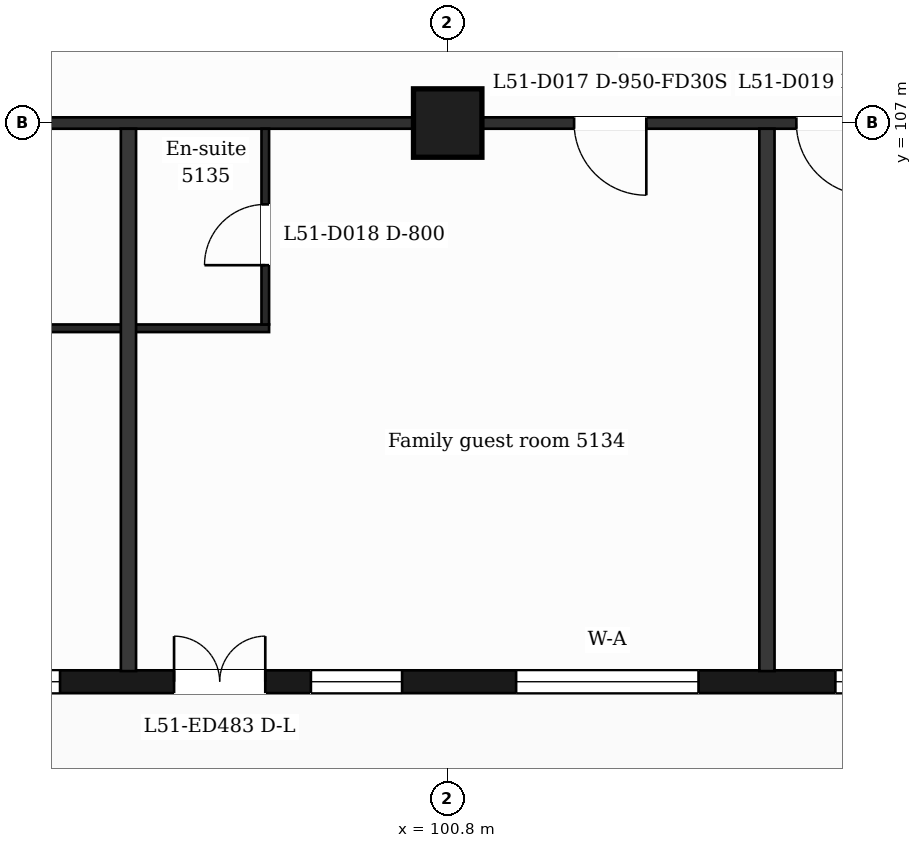
"""IFC4 building model, lengths in metres.
Left out: names, types, materials, properties, quantities, classifications, styles, units other than length and angle.
Written with IfcOpenShell. Run it as: python <this file> out.ifc"""

import sys

from ifc_helpers import new_model, si_unit, direction, frame, frame_2d, origin, origin_2d, place, context, subcontext, project, spatial, rectangle, extrude, element, fill, save


model = new_model("IFC4")
c1 = context("Model", 3, precision=1e-05, world=origin(), true_north=direction((0.0, 1.0)))
c2 = subcontext(c1, "Body", "Model", "MODEL_VIEW")
j1 = project(units=[si_unit("LENGTHUNIT", "METRE"), si_unit("PLANEANGLEUNIT", "RADIAN")], contexts=[c1])
p1 = place(None, origin())
s1 = spatial("IfcSite", under=j1, at=p1, CompositionType="ELEMENT")
p2 = place(p1, origin())
s2 = spatial("IfcBuilding", under=s1, at=p2, CompositionType="ELEMENT")
p3 = place(p2, frame((0.0, 0.0, 213.3)))
s3 = spatial("IfcBuildingStorey", under=s2, at=p3, CompositionType="ELEMENT", Elevation=213.3)
p4 = place(p3, frame((100.8, 107.0, 0.0), z_axis=(0.0, 0.0, 1.0), x_axis=(1.0, 0.0, 0.0)))
e1 = element("IfcColumn", 1, at=p4, inside=s3, PredefinedType="COLUMN", context=c2, shape_type="SweptSolid", body=[
    extrude(rectangle(XDim=0.9, YDim=0.9, at=origin_2d()), origin(), (0.0, 0.0, 1.0), 3.7),
])
p5 = place(p3, frame((89.85, 99.65, 0.0), z_axis=(0.0, 0.0, 1.0), x_axis=(1.0, 0.0, 0.0)))
e2 = element("IfcWall", 2, at=p5, inside=s3, PredefinedType="SOLIDWALL", context=c2, shape_type="SweptSolid", body=[
    extrude(rectangle(XDim=47.25, YDim=0.3, at=frame_2d((23.625, 0.0))), origin(), (0.0, 0.0, 1.0), 3.38),
])
p6 = place(p5, frame((0.725, 0.0, 0.9)))
e3 = element("IfcOpeningElement", 3, at=p6, cuts=e2, PredefinedType="OPENING", context=c2, shape_type="SweptSolid", body=[
    extrude(rectangle(XDim=1.2, YDim=2.1, at=frame_2d((0.6, 1.05))), frame((0.0, 0.16, 0.0), z_axis=(0.0, -1.0, 0.0), x_axis=(1.0, 0.0, 0.0)), (0.0, 0.0, 1.0), 0.32),
])
p7 = place(p5, frame((3.45, 0.0, 0.9)))
e4 = element("IfcOpeningElement", 4, at=p7, cuts=e2, PredefinedType="OPENING", context=c2, shape_type="SweptSolid", body=[
    extrude(rectangle(XDim=2.4, YDim=2.1, at=frame_2d((1.2, 1.05))), frame((0.0, 0.16, 0.0), z_axis=(0.0, -1.0, 0.0), x_axis=(1.0, 0.0, 0.0)), (0.0, 0.0, 1.0), 0.32),
])
p8 = place(p5, frame((7.35, 0.0, 0.0)))
e5 = element("IfcOpeningElement", 5, at=p8, cuts=e2, PredefinedType="OPENING", context=c2, shape_type="SweptSolid", body=[
    extrude(rectangle(XDim=1.2, YDim=2.4, at=frame_2d((0.6, 1.2))), frame((0.0, 0.16, 0.0), z_axis=(0.0, -1.0, 0.0), x_axis=(1.0, 0.0, 0.0)), (0.0, 0.0, 1.0), 0.32),
])
p9 = place(p5, frame((9.15, 0.0, 0.9)))
e6 = element("IfcOpeningElement", 6, at=p9, cuts=e2, PredefinedType="OPENING", context=c2, shape_type="SweptSolid", body=[
    extrude(rectangle(XDim=1.2, YDim=2.1, at=frame_2d((0.6, 1.05))), frame((0.0, 0.16, 0.0), z_axis=(0.0, -1.0, 0.0), x_axis=(1.0, 0.0, 0.0)), (0.0, 0.0, 1.0), 0.32),
])
p10 = place(p5, frame((11.85, 0.0, 0.9)))
e7 = element("IfcOpeningElement", 7, at=p10, cuts=e2, PredefinedType="OPENING", context=c2, shape_type="SweptSolid", body=[
    extrude(rectangle(XDim=2.4, YDim=2.1, at=frame_2d((1.2, 1.05))), frame((0.0, 0.16, 0.0), z_axis=(0.0, -1.0, 0.0), x_axis=(1.0, 0.0, 0.0)), (0.0, 0.0, 1.0), 0.32),
])
p11 = place(p5, frame((16.05, 0.0, 0.9)))
e8 = element("IfcOpeningElement", 8, at=p11, cuts=e2, PredefinedType="OPENING", context=c2, shape_type="SweptSolid", body=[
    extrude(rectangle(XDim=2.4, YDim=2.1, at=frame_2d((1.2, 1.05))), frame((0.0, 0.16, 0.0), z_axis=(0.0, -1.0, 0.0), x_axis=(1.0, 0.0, 0.0)), (0.0, 0.0, 1.0), 0.32),
])
p12 = place(p5, frame((20.85, 0.0, 0.9)))
e9 = element("IfcOpeningElement", 9, at=p12, cuts=e2, PredefinedType="OPENING", context=c2, shape_type="SweptSolid", body=[
    extrude(rectangle(XDim=1.2, YDim=2.1, at=frame_2d((0.6, 1.05))), frame((0.0, 0.16, 0.0), z_axis=(0.0, -1.0, 0.0), x_axis=(1.0, 0.0, 0.0)), (0.0, 0.0, 1.0), 0.32),
])
p13 = place(p5, frame((25.05, 0.0, 0.9)))
e10 = element("IfcOpeningElement", 10, at=p13, cuts=e2, PredefinedType="OPENING", context=c2, shape_type="SweptSolid", body=[
    extrude(rectangle(XDim=1.2, YDim=2.1, at=frame_2d((0.6, 1.05))), frame((0.0, 0.16, 0.0), z_axis=(0.0, -1.0, 0.0), x_axis=(1.0, 0.0, 0.0)), (0.0, 0.0, 1.0), 0.32),
])
p14 = place(p5, frame((28.65, 0.0, 0.9)))
e11 = element("IfcOpeningElement", 11, at=p14, cuts=e2, PredefinedType="OPENING", context=c2, shape_type="SweptSolid", body=[
    extrude(rectangle(XDim=2.4, YDim=2.1, at=frame_2d((1.2, 1.05))), frame((0.0, 0.16, 0.0), z_axis=(0.0, -1.0, 0.0), x_axis=(1.0, 0.0, 0.0)), (0.0, 0.0, 1.0), 0.32),
])
p15 = place(p5, frame((32.85, 0.0, 0.9)))
e12 = element("IfcOpeningElement", 12, at=p15, cuts=e2, PredefinedType="OPENING", context=c2, shape_type="SweptSolid", body=[
    extrude(rectangle(XDim=2.4, YDim=2.1, at=frame_2d((1.2, 1.05))), frame((0.0, 0.16, 0.0), z_axis=(0.0, -1.0, 0.0), x_axis=(1.0, 0.0, 0.0)), (0.0, 0.0, 1.0), 0.32),
])
p16 = place(p5, frame((37.05, 0.0, 0.9)))
e13 = element("IfcOpeningElement", 13, at=p16, cuts=e2, PredefinedType="OPENING", context=c2, shape_type="SweptSolid", body=[
    extrude(rectangle(XDim=2.4, YDim=2.1, at=frame_2d((1.2, 1.05))), frame((0.0, 0.16, 0.0), z_axis=(0.0, -1.0, 0.0), x_axis=(1.0, 0.0, 0.0)), (0.0, 0.0, 1.0), 0.32),
])
p17 = place(p5, frame((41.25, 0.0, 0.9)))
e14 = element("IfcOpeningElement", 14, at=p17, cuts=e2, PredefinedType="OPENING", context=c2, shape_type="SweptSolid", body=[
    extrude(rectangle(XDim=2.4, YDim=2.1, at=frame_2d((1.2, 1.05))), frame((0.0, 0.16, 0.0), z_axis=(0.0, -1.0, 0.0), x_axis=(1.0, 0.0, 0.0)), (0.0, 0.0, 1.0), 0.32),
])
p18 = place(p5, frame((45.25, 0.0, 0.9)))
e15 = element("IfcOpeningElement", 15, at=p18, cuts=e2, PredefinedType="OPENING", context=c2, shape_type="SweptSolid", body=[
    extrude(rectangle(XDim=1.2, YDim=2.1, at=frame_2d((0.6, 1.05))), frame((0.0, 0.16, 0.0), z_axis=(0.0, -1.0, 0.0), x_axis=(1.0, 0.0, 0.0)), (0.0, 0.0, 1.0), 0.32),
])
p19 = place(p3, frame((94.45, 104.3, 0.0), z_axis=(0.0, 0.0, 1.0), x_axis=(1.0, 0.0, 0.0)))
e16 = element("IfcWall", 16, at=p19, inside=s3, PredefinedType="PARTITIONING", context=c2, shape_type="SweptSolid", body=[
    extrude(rectangle(XDim=4.0, YDim=0.1, at=frame_2d((2.0, 0.0))), origin(), (0.0, 0.0, 1.0), 3.38),
])
p20 = place(p3, frame((87.018, 107.0, 0.0), z_axis=(0.0, 0.0, 1.0), x_axis=(1.0, 0.0, 0.0)))
e17 = element("IfcWall", 17, at=p20, inside=s3, PredefinedType="PARTITIONING", context=c2, shape_type="SweptSolid", body=[
    extrude(rectangle(XDim=52.765, YDim=0.15, at=frame_2d((26.382, 0.0))), origin(), (0.0, 0.0, 1.0), 3.38),
])
p21 = place(p20, frame((1.276, 0.0, 0.0)))
e18 = element("IfcOpeningElement", 18, at=p21, cuts=e17, PredefinedType="OPENING", context=c2, shape_type="SweptSolid", body=[
    extrude(rectangle(XDim=0.95, YDim=2.1, at=frame_2d((0.475, 1.05))), frame((0.0, 0.085, 0.0), z_axis=(0.0, -1.0, 0.0), x_axis=(1.0, 0.0, 0.0)), (0.0, 0.0, 1.0), 0.17),
])
p22 = place(p20, frame((6.034, 0.0, 0.0)))
e19 = element("IfcOpeningElement", 19, at=p22, cuts=e17, PredefinedType="OPENING", context=c2, shape_type="SweptSolid", body=[
    extrude(rectangle(XDim=0.95, YDim=2.1, at=frame_2d((0.475, 1.05))), frame((0.0, 0.085, 0.0), z_axis=(0.0, -1.0, 0.0), x_axis=(1.0, 0.0, 0.0)), (0.0, 0.0, 1.0), 0.17),
])
p23 = place(p20, frame((15.445, 0.0, 0.0)))
e20 = element("IfcOpeningElement", 20, at=p23, cuts=e17, PredefinedType="OPENING", context=c2, shape_type="SweptSolid", body=[
    extrude(rectangle(XDim=0.95, YDim=2.1, at=frame_2d((0.475, 1.05))), frame((0.0, 0.085, 0.0), z_axis=(0.0, -1.0, 0.0), x_axis=(1.0, 0.0, 0.0)), (0.0, 0.0, 1.0), 0.17),
])
p24 = place(p20, frame((18.369, 0.0, 0.0)))
e21 = element("IfcOpeningElement", 21, at=p24, cuts=e17, PredefinedType="OPENING", context=c2, shape_type="SweptSolid", body=[
    extrude(rectangle(XDim=0.95, YDim=2.1, at=frame_2d((0.475, 1.05))), frame((0.0, 0.085, 0.0), z_axis=(0.0, -1.0, 0.0), x_axis=(1.0, 0.0, 0.0)), (0.0, 0.0, 1.0), 0.17),
])
p25 = place(p20, frame((24.519, 0.0, 0.0)))
e22 = element("IfcOpeningElement", 22, at=p25, cuts=e17, PredefinedType="OPENING", context=c2, shape_type="SweptSolid", body=[
    extrude(rectangle(XDim=0.95, YDim=2.1, at=frame_2d((0.475, 1.05))), frame((0.0, 0.085, 0.0), z_axis=(0.0, -1.0, 0.0), x_axis=(1.0, 0.0, 0.0)), (0.0, 0.0, 1.0), 0.17),
])
p26 = place(p20, frame((26.632, 0.0, 0.0)))
e23 = element("IfcOpeningElement", 23, at=p26, cuts=e17, PredefinedType="OPENING", context=c2, shape_type="SweptSolid", body=[
    extrude(rectangle(XDim=1.0, YDim=2.1, at=frame_2d((0.5, 1.05))), frame((0.0, 0.085, 0.0), z_axis=(0.0, -1.0, 0.0), x_axis=(1.0, 0.0, 0.0)), (0.0, 0.0, 1.0), 0.17),
])
p27 = place(p20, frame((33.422, 0.0, 0.0)))
e24 = element("IfcOpeningElement", 24, at=p27, cuts=e17, PredefinedType="OPENING", context=c2, shape_type="SweptSolid", body=[
    extrude(rectangle(XDim=0.95, YDim=2.1, at=frame_2d((0.475, 1.05))), frame((0.0, 0.085, 0.0), z_axis=(0.0, -1.0, 0.0), x_axis=(1.0, 0.0, 0.0)), (0.0, 0.0, 1.0), 0.17),
])
p28 = place(p20, frame((35.057, 0.0, 0.0)))
e25 = element("IfcOpeningElement", 25, at=p28, cuts=e17, PredefinedType="OPENING", context=c2, shape_type="SweptSolid", body=[
    extrude(rectangle(XDim=0.95, YDim=2.1, at=frame_2d((0.475, 1.05))), frame((0.0, 0.085, 0.0), z_axis=(0.0, -1.0, 0.0), x_axis=(1.0, 0.0, 0.0)), (0.0, 0.0, 1.0), 0.17),
])
p29 = place(p20, frame((44.532, 0.0, 0.0)))
e26 = element("IfcOpeningElement", 26, at=p29, cuts=e17, PredefinedType="OPENING", context=c2, shape_type="SweptSolid", body=[
    extrude(rectangle(XDim=1.0, YDim=2.1, at=frame_2d((0.5, 1.05))), frame((0.0, 0.085, 0.0), z_axis=(0.0, -1.0, 0.0), x_axis=(1.0, 0.0, 0.0)), (0.0, 0.0, 1.0), 0.17),
])
p30 = place(p20, frame((48.249, 0.0, 0.0)))
e27 = element("IfcOpeningElement", 27, at=p30, cuts=e17, PredefinedType="OPENING", context=c2, shape_type="SweptSolid", body=[
    extrude(rectangle(XDim=0.95, YDim=2.1, at=frame_2d((0.475, 1.05))), frame((0.0, 0.085, 0.0), z_axis=(0.0, -1.0, 0.0), x_axis=(1.0, 0.0, 0.0)), (0.0, 0.0, 1.0), 0.17),
])
p31 = place(p3, frame((96.6, 99.79, 0.0), z_axis=(0.0, 0.0, 1.0), x_axis=(0.0, 1.0, 0.0)))
e28 = element("IfcWall", 28, at=p31, inside=s3, PredefinedType="PARTITIONING", context=c2, shape_type="SweptSolid", body=[
    extrude(rectangle(XDim=7.135, YDim=0.2, at=frame_2d((3.567, 0.0))), origin(), (0.0, 0.0, 1.0), 3.38),
])
p32 = place(p3, frame((98.4, 104.35, 0.0), z_axis=(0.0, 0.0, 1.0), x_axis=(0.0, 1.0, 0.0)))
e29 = element("IfcWall", 29, at=p32, inside=s3, PredefinedType="PARTITIONING", context=c2, shape_type="SweptSolid", body=[
    extrude(rectangle(XDim=2.575, YDim=0.1, at=frame_2d((1.288, 0.0))), origin(), (0.0, 0.0, 1.0), 3.38),
])
p33 = place(p32, frame((0.78, 0.0, 0.0)))
e30 = element("IfcOpeningElement", 30, at=p33, cuts=e29, PredefinedType="OPENING", context=c2, shape_type="SweptSolid", body=[
    extrude(rectangle(XDim=0.8, YDim=2.1, at=frame_2d((0.4, 1.05))), frame((0.0, 0.06, 0.0), z_axis=(0.0, -1.0, 0.0), x_axis=(1.0, 0.0, 0.0)), (0.0, 0.0, 1.0), 0.12),
])
p34 = place(p3, frame((105.0, 99.79, 0.0), z_axis=(0.0, 0.0, 1.0), x_axis=(0.0, 1.0, 0.0)))
e31 = element("IfcWall", 31, at=p34, inside=s3, PredefinedType="PARTITIONING", context=c2, shape_type="SweptSolid", body=[
    extrude(rectangle(XDim=7.135, YDim=0.2, at=frame_2d((3.567, 0.0))), origin(), (0.0, 0.0, 1.0), 3.38),
])
p35 = place(p7, origin())
e32 = element("IfcWindow", 32, at=p35, inside=s3, PartitioningType="SINGLE_PANEL", PredefinedType="WINDOW", context=c2, shape_type="SweptSolid", body=[
    extrude(rectangle(XDim=2.4, YDim=2.1, at=frame_2d((1.2, 1.05))), frame((0.0, 0.03, 0.0), z_axis=(0.0, -1.0, 0.0), x_axis=(1.0, 0.0, 0.0)), (0.0, 0.0, 1.0), 0.06),
])
fill(e4, e32)
p36 = place(p8, origin())
e33 = element("IfcDoor", 33, at=p36, inside=s3, OperationType="DOUBLE_DOOR_SINGLE_SWING", PredefinedType="DOOR", context=c2, shape_type="SweptSolid", body=[
    extrude(rectangle(XDim=1.2, YDim=2.4, at=frame_2d((0.6, 1.2))), frame((0.0, 0.025, 0.0), z_axis=(0.0, -1.0, 0.0), x_axis=(1.0, 0.0, 0.0)), (0.0, 0.0, 1.0), 0.05),
])
fill(e5, e33)
p37 = place(p9, origin())
e34 = element("IfcWindow", 34, at=p37, inside=s3, PartitioningType="SINGLE_PANEL", PredefinedType="WINDOW", context=c2, shape_type="SweptSolid", body=[
    extrude(rectangle(XDim=1.2, YDim=2.1, at=frame_2d((0.6, 1.05))), frame((0.0, 0.03, 0.0), z_axis=(0.0, -1.0, 0.0), x_axis=(1.0, 0.0, 0.0)), (0.0, 0.0, 1.0), 0.06),
])
fill(e6, e34)
p38 = place(p10, origin())
e35 = element("IfcWindow", 35, at=p38, inside=s3, PartitioningType="SINGLE_PANEL", PredefinedType="WINDOW", context=c2, shape_type="SweptSolid", body=[
    extrude(rectangle(XDim=2.4, YDim=2.1, at=frame_2d((1.2, 1.05))), frame((0.0, 0.03, 0.0), z_axis=(0.0, -1.0, 0.0), x_axis=(1.0, 0.0, 0.0)), (0.0, 0.0, 1.0), 0.06),
])
fill(e7, e35)
p39 = place(p11, origin())
e36 = element("IfcWindow", 36, at=p39, inside=s3, PartitioningType="SINGLE_PANEL", PredefinedType="WINDOW", context=c2, shape_type="SweptSolid", body=[
    extrude(rectangle(XDim=2.4, YDim=2.1, at=frame_2d((1.2, 1.05))), frame((0.0, 0.03, 0.0), z_axis=(0.0, -1.0, 0.0), x_axis=(1.0, 0.0, 0.0)), (0.0, 0.0, 1.0), 0.06),
])
fill(e8, e36)
p40 = place(p23, origin())
e37 = element("IfcDoor", 37, at=p40, inside=s3, OperationType="SINGLE_SWING_RIGHT", PredefinedType="DOOR", context=c2, shape_type="SweptSolid", body=[
    extrude(rectangle(XDim=0.95, YDim=2.1, at=frame_2d((0.475, 1.05))), frame((0.0, 0.025, 0.0), z_axis=(0.0, -1.0, 0.0), x_axis=(1.0, 0.0, 0.0)), (0.0, 0.0, 1.0), 0.05),
])
fill(e20, e37)
p41 = place(p33, origin())
e38 = element("IfcDoor", 38, at=p41, inside=s3, OperationType="SINGLE_SWING_LEFT", PredefinedType="DOOR", context=c2, shape_type="SweptSolid", body=[
    extrude(rectangle(XDim=0.8, YDim=2.1, at=frame_2d((0.4, 1.05))), frame((0.0, 0.025, 0.0), z_axis=(0.0, -1.0, 0.0), x_axis=(1.0, 0.0, 0.0)), (0.0, 0.0, 1.0), 0.05),
])
fill(e30, e38)
p42 = place(p24, origin())
e39 = element("IfcDoor", 39, at=p42, inside=s3, OperationType="SINGLE_SWING_RIGHT", PredefinedType="DOOR", context=c2, shape_type="SweptSolid", body=[
    extrude(rectangle(XDim=0.95, YDim=2.1, at=frame_2d((0.475, 1.05))), frame((0.0, 0.025, 0.0), z_axis=(0.0, -1.0, 0.0), x_axis=(1.0, 0.0, 0.0)), (0.0, 0.0, 1.0), 0.05),
])
fill(e21, e39)
save(model, sys.argv[1])
